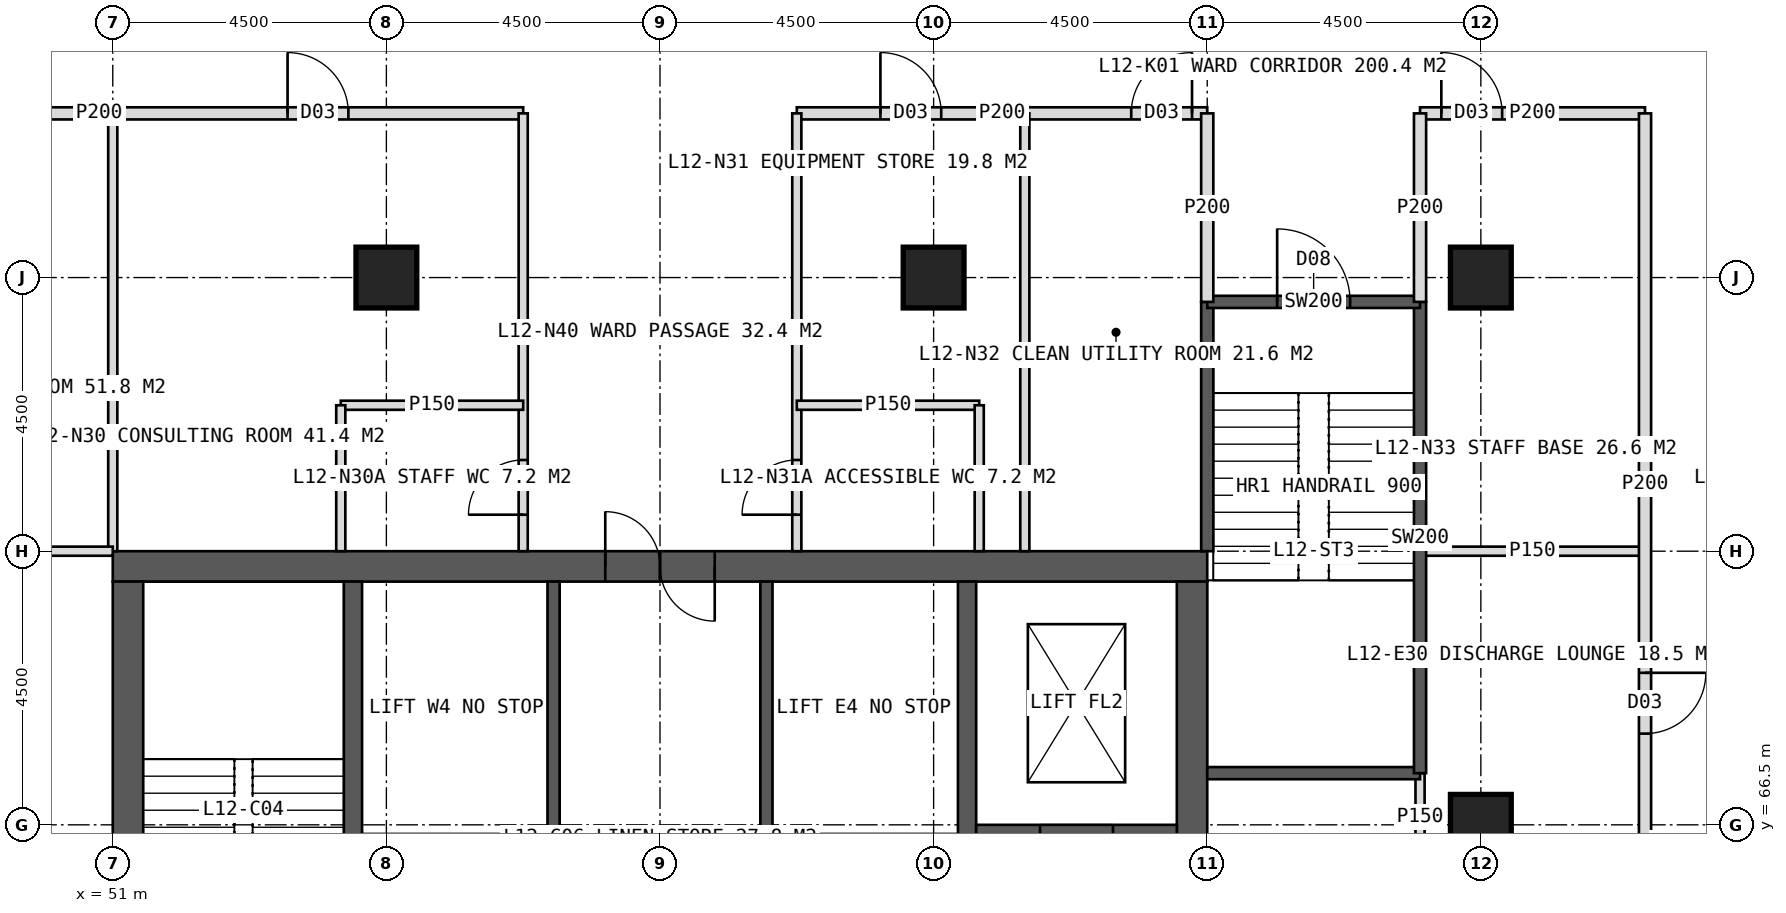
"""IFC4 building model, lengths in metres.
Left out: names, types, materials, properties, quantities, classifications, styles, units other than length and angle.
Written with IfcOpenShell. Run it as: python <this file> out.ifc"""

import sys

from ifc_helpers import new_model, si_unit, direction, frame, frame_2d, origin, origin_2d, place, context, subcontext, project, spatial, rectangle, hollow_rectangle, extrude, element, fill, save


model = new_model("IFC4")
c1 = context("Model", 3, precision=1e-05, world=origin(), true_north=direction((0.0, 1.0)))
c2 = subcontext(c1, "Body", "Model", "MODEL_VIEW")
j1 = project(units=[si_unit("LENGTHUNIT", "METRE"), si_unit("PLANEANGLEUNIT", "RADIAN")], contexts=[c1])
p1 = place(None, origin())
s1 = spatial("IfcSite", under=j1, at=p1, CompositionType="ELEMENT")
p2 = place(p1, origin())
s2 = spatial("IfcBuilding", under=s1, at=p2, CompositionType="ELEMENT")
p3 = place(p2, frame((0.0, 0.0, 55.0)))
s3 = spatial("IfcBuildingStorey", under=s2, at=p3, CompositionType="ELEMENT", Elevation=55.0)
p4 = place(p3, frame((51.0, 70.75, 0.0), z_axis=(0.0, 0.0, 1.0), x_axis=(1.0, 0.0, 0.0)))
e1 = element("IfcWall", 1, at=p4, inside=s3, PredefinedType="SHEAR", context=c2, shape_type="SweptSolid", body=[
    extrude(rectangle(XDim=18.0, YDim=0.5, at=frame_2d((9.0, 0.0))), origin(), (0.0, 0.0, 1.0), 4.0),
])
p5 = place(p4, frame((8.1, 0.0, 0.0)))
e2 = element("IfcOpeningElement", 2, at=p5, cuts=e1, PredefinedType="OPENING", context=c2, shape_type="SweptSolid", body=[
    extrude(rectangle(XDim=1.8, YDim=2.2, at=frame_2d((0.9, 1.1))), frame((0.0, 0.26, 0.0), z_axis=(0.0, -1.0, 0.0), x_axis=(1.0, 0.0, 0.0)), (0.0, 0.0, 1.0), 0.52),
])
p6 = place(p3, frame((51.25, 53.5, 0.0), z_axis=(0.0, 0.0, 1.0), x_axis=(0.0, 1.0, 0.0)))
e3 = element("IfcWall", 3, at=p6, inside=s3, PredefinedType="SHEAR", context=c2, shape_type="SweptSolid", body=[
    extrude(rectangle(XDim=17.0, YDim=0.5, at=frame_2d((8.5, 0.0))), origin(), (0.0, 0.0, 1.0), 4.0),
])
p7 = place(p6, frame((6.0, 0.0, 0.0)))
e4 = element("IfcOpeningElement", 4, at=p7, cuts=e3, PredefinedType="OPENING", context=c2, shape_type="SweptSolid", body=[
    extrude(rectangle(XDim=1.5, YDim=2.2, at=frame_2d((0.75, 1.1))), frame((0.0, 0.26, 0.0), z_axis=(0.0, -1.0, 0.0), x_axis=(1.0, 0.0, 0.0)), (0.0, 0.0, 1.0), 0.52),
])
p8 = place(p3, frame((68.75, 53.5, 0.0), z_axis=(0.0, 0.0, 1.0), x_axis=(0.0, 1.0, 0.0)))
e5 = element("IfcWall", 5, at=p8, inside=s3, PredefinedType="SHEAR", context=c2, shape_type="SweptSolid", body=[
    extrude(rectangle(XDim=17.0, YDim=0.5, at=frame_2d((8.5, 0.0))), origin(), (0.0, 0.0, 1.0), 4.0),
])
p9 = place(p8, frame((9.5, 0.0, 0.0)))
e6 = element("IfcOpeningElement", 6, at=p9, cuts=e5, PredefinedType="OPENING", context=c2, shape_type="SweptSolid", body=[
    extrude(rectangle(XDim=1.5, YDim=2.2, at=frame_2d((0.75, 1.1))), frame((0.0, 0.26, 0.0), z_axis=(0.0, -1.0, 0.0), x_axis=(1.0, 0.0, 0.0)), (0.0, 0.0, 1.0), 0.52),
])
for number, where, z_axis, x_axis in (
    (7, (54.95, 53.5, 0.0), (0.0, 0.0, 1.0), (0.0, 1.0, 0.0)),
    (8, (65.05, 53.5, 0.0), (0.0, 0.0, 1.0), (0.0, 1.0, 0.0)),
):
    element("IfcWall", number, at=place(p3, frame(where, z_axis=z_axis, x_axis=x_axis)), inside=s3, PredefinedType="SHEAR", context=c2, shape_type="SweptSolid", body=[
        extrude(rectangle(XDim=17.0, YDim=0.3, at=frame_2d((8.5, 0.0))), origin(), (0.0, 0.0, 1.0), 4.0),
    ])
p10 = place(p3, frame((58.25, 53.5, 0.0), z_axis=(0.0, 0.0, 1.0), x_axis=(0.0, 1.0, 0.0)))
e9 = element("IfcWall", 9, at=p10, inside=s3, PredefinedType="SHEAR", context=c2, shape_type="SweptSolid", body=[
    extrude(rectangle(XDim=17.0, YDim=0.2, at=frame_2d((8.5, 0.0))), origin(), (0.0, 0.0, 1.0), 4.0),
])
p11 = place(p10, frame((1.375, 0.0, 0.0)))
e10 = element("IfcOpeningElement", 10, at=p11, cuts=e9, PredefinedType="OPENING", context=c2, shape_type="SweptSolid", body=[
    extrude(rectangle(XDim=1.4, YDim=2.2, at=frame_2d((0.7, 1.1))), frame((0.0, 0.11, 0.0), z_axis=(0.0, -1.0, 0.0), x_axis=(1.0, 0.0, 0.0)), (0.0, 0.0, 1.0), 0.22),
])
p12 = place(p10, frame((5.675, 0.0, 0.0)))
e11 = element("IfcOpeningElement", 11, at=p12, cuts=e9, PredefinedType="OPENING", context=c2, shape_type="SweptSolid", body=[
    extrude(rectangle(XDim=1.4, YDim=2.2, at=frame_2d((0.7, 1.1))), frame((0.0, 0.11, 0.0), z_axis=(0.0, -1.0, 0.0), x_axis=(1.0, 0.0, 0.0)), (0.0, 0.0, 1.0), 0.22),
])
p13 = place(p3, frame((61.75, 53.5, 0.0), z_axis=(0.0, 0.0, 1.0), x_axis=(0.0, 1.0, 0.0)))
e12 = element("IfcWall", 12, at=p13, inside=s3, PredefinedType="SHEAR", context=c2, shape_type="SweptSolid", body=[
    extrude(rectangle(XDim=17.0, YDim=0.2, at=frame_2d((8.5, 0.0))), origin(), (0.0, 0.0, 1.0), 4.0),
])
p14 = place(p13, frame((1.375, 0.0, 0.0)))
e13 = element("IfcOpeningElement", 13, at=p14, cuts=e12, PredefinedType="OPENING", context=c2, shape_type="SweptSolid", body=[
    extrude(rectangle(XDim=1.4, YDim=2.2, at=frame_2d((0.7, 1.1))), frame((0.0, 0.11, 0.0), z_axis=(0.0, -1.0, 0.0), x_axis=(1.0, 0.0, 0.0)), (0.0, 0.0, 1.0), 0.22),
])
p15 = place(p13, frame((5.675, 0.0, 0.0)))
e14 = element("IfcOpeningElement", 14, at=p15, cuts=e12, PredefinedType="OPENING", context=c2, shape_type="SweptSolid", body=[
    extrude(rectangle(XDim=1.4, YDim=2.2, at=frame_2d((0.7, 1.1))), frame((0.0, 0.11, 0.0), z_axis=(0.0, -1.0, 0.0), x_axis=(1.0, 0.0, 0.0)), (0.0, 0.0, 1.0), 0.22),
])
p16 = place(p3, frame((65.2, 66.35, 0.0), z_axis=(0.0, 0.0, 1.0), x_axis=(1.0, 0.0, 0.0)))
e15 = element("IfcWall", 15, at=p16, inside=s3, PredefinedType="SHEAR", context=c2, shape_type="SweptSolid", body=[
    extrude(rectangle(XDim=3.3, YDim=0.3, at=frame_2d((1.65, 0.0))), origin(), (0.0, 0.0, 1.0), 4.0),
])
p17 = place(p16, frame((1.05, 0.0, 0.0)))
e16 = element("IfcOpeningElement", 16, at=p17, cuts=e15, PredefinedType="OPENING", context=c2, shape_type="SweptSolid", body=[
    extrude(rectangle(XDim=1.2, YDim=2.2, at=frame_2d((0.6, 1.1))), frame((0.0, 0.16, 0.0), z_axis=(0.0, -1.0, 0.0), x_axis=(1.0, 0.0, 0.0)), (0.0, 0.0, 1.0), 0.32),
])
for number, where, z_axis, x_axis in (
    (17, (73.5, 75.5, 0.0), (0.0, 0.0, 1.0), (1.0, 0.0, 0.0)),
    (18, (55.5, 75.5, 0.0), (0.0, 0.0, 1.0), (1.0, 0.0, 0.0)),
    (19, (64.5, 75.5, 0.0), (0.0, 0.0, 1.0), (1.0, 0.0, 0.0)),
    (20, (73.5, 66.5, 0.0), (0.0, 0.0, 1.0), (1.0, 0.0, 0.0)),
):
    element("IfcColumn", number, at=place(p3, frame(where, z_axis=z_axis, x_axis=x_axis)), inside=s3, PredefinedType="COLUMN", context=c2, shape_type="SweptSolid", body=[
        extrude(hollow_rectangle(XDim=1.0, YDim=1.0, WallThickness=0.1, at=origin_2d()), origin(), (0.0, 0.0, 1.0), 4.0),
    ])
p18 = place(p3, frame((51.0, 71.0, 0.0), z_axis=(0.0, 0.0, 1.0), x_axis=(0.0, 1.0, 0.0)))
e21 = element("IfcWall", 21, at=p18, inside=s3, PredefinedType="PARTITIONING", context=c2, shape_type="SweptSolid", body=[
    extrude(rectangle(XDim=7.2, YDim=0.15, at=frame_2d((3.6, 0.0))), origin(), (0.0, 0.0, 1.0), 3.75),
])
p19 = place(p3, frame((43.8, 78.2, 0.0), z_axis=(0.0, 0.0, 1.0), x_axis=(1.0, 0.0, 0.0)))
e22 = element("IfcWall", 22, at=p19, inside=s3, PredefinedType="PARTITIONING", context=c2, shape_type="SweptSolid", body=[
    extrude(rectangle(XDim=13.95, YDim=0.2, at=frame_2d((6.975, 0.0))), origin(), (0.0, 0.0, 1.0), 3.75),
])
p20 = place(p19, frame((10.075, 0.0, 0.0)))
e23 = element("IfcOpeningElement", 23, at=p20, cuts=e22, PredefinedType="OPENING", context=c2, shape_type="SweptSolid", body=[
    extrude(rectangle(XDim=1.0, YDim=2.1, at=frame_2d((0.5, 1.05))), frame((0.0, 0.11, 0.0), z_axis=(0.0, -1.0, 0.0), x_axis=(1.0, 0.0, 0.0)), (0.0, 0.0, 1.0), 0.22),
])
p21 = place(p3, frame((62.25, 78.2, 0.0), z_axis=(0.0, 0.0, 1.0), x_axis=(1.0, 0.0, 0.0)))
e24 = element("IfcWall", 24, at=p21, inside=s3, PredefinedType="PARTITIONING", context=c2, shape_type="SweptSolid", body=[
    extrude(rectangle(XDim=6.75, YDim=0.2, at=frame_2d((3.375, 0.0))), origin(), (0.0, 0.0, 1.0), 3.75),
])
p22 = place(p21, frame((1.375, 0.0, 0.0)))
e25 = element("IfcOpeningElement", 25, at=p22, cuts=e24, PredefinedType="OPENING", context=c2, shape_type="SweptSolid", body=[
    extrude(rectangle(XDim=1.0, YDim=2.1, at=frame_2d((0.5, 1.05))), frame((0.0, 0.11, 0.0), z_axis=(0.0, -1.0, 0.0), x_axis=(1.0, 0.0, 0.0)), (0.0, 0.0, 1.0), 0.22),
])
p23 = place(p21, frame((5.5, 0.0, 0.0)))
e26 = element("IfcOpeningElement", 26, at=p23, cuts=e24, PredefinedType="OPENING", context=c2, shape_type="SweptSolid", body=[
    extrude(rectangle(XDim=1.0, YDim=2.1, at=frame_2d((0.5, 1.05))), frame((0.0, 0.11, 0.0), z_axis=(0.0, -1.0, 0.0), x_axis=(1.0, 0.0, 0.0)), (0.0, 0.0, 1.0), 0.22),
])
p24 = place(p3, frame((72.5, 78.2, 0.0), z_axis=(0.0, 0.0, 1.0), x_axis=(1.0, 0.0, 0.0)))
e27 = element("IfcWall", 27, at=p24, inside=s3, PredefinedType="PARTITIONING", context=c2, shape_type="SweptSolid", body=[
    extrude(rectangle(XDim=3.7, YDim=0.2, at=frame_2d((1.85, 0.0))), origin(), (0.0, 0.0, 1.0), 3.75),
])
p25 = place(p24, frame((0.35, 0.0, 0.0)))
e28 = element("IfcOpeningElement", 28, at=p25, cuts=e27, PredefinedType="OPENING", context=c2, shape_type="SweptSolid", body=[
    extrude(rectangle(XDim=1.0, YDim=2.1, at=frame_2d((0.5, 1.05))), frame((0.0, 0.11, 0.0), z_axis=(0.0, -1.0, 0.0), x_axis=(1.0, 0.0, 0.0)), (0.0, 0.0, 1.0), 0.22),
])
p26 = place(p3, frame((57.75, 71.0, 0.0), z_axis=(0.0, 0.0, 1.0), x_axis=(0.0, 1.0, 0.0)))
e29 = element("IfcWall", 29, at=p26, inside=s3, PredefinedType="PARTITIONING", context=c2, shape_type="SweptSolid", body=[
    extrude(rectangle(XDim=7.2, YDim=0.15, at=frame_2d((3.6, 0.0))), origin(), (0.0, 0.0, 1.0), 3.75),
])
p27 = place(p26, frame((0.6, 0.0, 0.0)))
e30 = element("IfcOpeningElement", 30, at=p27, cuts=e29, PredefinedType="OPENING", context=c2, shape_type="SweptSolid", body=[
    extrude(rectangle(XDim=0.9, YDim=2.1, at=frame_2d((0.45, 1.05))), frame((0.0, 0.085, 0.0), z_axis=(0.0, -1.0, 0.0), x_axis=(1.0, 0.0, 0.0)), (0.0, 0.0, 1.0), 0.17),
])
p28 = place(p3, frame((62.25, 71.0, 0.0), z_axis=(0.0, 0.0, 1.0), x_axis=(0.0, 1.0, 0.0)))
e31 = element("IfcWall", 31, at=p28, inside=s3, PredefinedType="PARTITIONING", context=c2, shape_type="SweptSolid", body=[
    extrude(rectangle(XDim=7.2, YDim=0.15, at=frame_2d((3.6, 0.0))), origin(), (0.0, 0.0, 1.0), 3.75),
])
p29 = place(p28, frame((0.6, 0.0, 0.0)))
e32 = element("IfcOpeningElement", 32, at=p29, cuts=e31, PredefinedType="OPENING", context=c2, shape_type="SweptSolid", body=[
    extrude(rectangle(XDim=0.9, YDim=2.1, at=frame_2d((0.45, 1.05))), frame((0.0, 0.085, 0.0), z_axis=(0.0, -1.0, 0.0), x_axis=(1.0, 0.0, 0.0)), (0.0, 0.0, 1.0), 0.17),
])
p30 = place(p3, frame((66.0, 71.0, 0.0), z_axis=(0.0, 0.0, 1.0), x_axis=(0.0, 1.0, 0.0)))
e33 = element("IfcWall", 33, at=p30, inside=s3, PredefinedType="PARTITIONING", context=c2, shape_type="SweptSolid", body=[
    extrude(rectangle(XDim=7.2, YDim=0.15, at=frame_2d((3.6, 0.0))), origin(), (0.0, 0.0, 1.0), 3.75),
])
p31 = place(p3, frame((54.75, 73.4, 0.0), z_axis=(0.0, 0.0, 1.0), x_axis=(1.0, 0.0, 0.0)))
e34 = element("IfcWall", 34, at=p31, inside=s3, PredefinedType="PARTITIONING", context=c2, shape_type="SweptSolid", body=[
    extrude(rectangle(XDim=3.0, YDim=0.15, at=frame_2d((1.5, 0.0))), origin(), (0.0, 0.0, 1.0), 3.75),
])
p32 = place(p3, frame((54.75, 71.0, 0.0), z_axis=(0.0, 0.0, 1.0), x_axis=(0.0, 1.0, 0.0)))
e35 = element("IfcWall", 35, at=p32, inside=s3, PredefinedType="PARTITIONING", context=c2, shape_type="SweptSolid", body=[
    extrude(rectangle(XDim=2.4, YDim=0.15, at=frame_2d((1.2, 0.0))), origin(), (0.0, 0.0, 1.0), 3.75),
])
p33 = place(p3, frame((62.25, 73.4, 0.0), z_axis=(0.0, 0.0, 1.0), x_axis=(1.0, 0.0, 0.0)))
e36 = element("IfcWall", 36, at=p33, inside=s3, PredefinedType="PARTITIONING", context=c2, shape_type="SweptSolid", body=[
    extrude(rectangle(XDim=3.0, YDim=0.15, at=frame_2d((1.5, 0.0))), origin(), (0.0, 0.0, 1.0), 3.75),
])
p34 = place(p3, frame((65.25, 71.0, 0.0), z_axis=(0.0, 0.0, 1.0), x_axis=(0.0, 1.0, 0.0)))
e37 = element("IfcWall", 37, at=p34, inside=s3, PredefinedType="PARTITIONING", context=c2, shape_type="SweptSolid", body=[
    extrude(rectangle(XDim=2.4, YDim=0.15, at=frame_2d((1.2, 0.0))), origin(), (0.0, 0.0, 1.0), 3.75),
])
p35 = place(p3, frame((51.0, 71.0, 0.0), z_axis=(0.0, 0.0, 1.0), x_axis=(-1.0, 0.0, 0.0)))
e38 = element("IfcWall", 38, at=p35, inside=s3, PredefinedType="PARTITIONING", context=c2, shape_type="SweptSolid", body=[
    extrude(rectangle(XDim=7.2, YDim=0.15, at=frame_2d((3.6, 0.0))), origin(), (0.0, 0.0, 1.0), 3.75),
])
p36 = place(p3, frame((72.5, 71.0, 0.0), z_axis=(0.0, 0.0, 1.0), x_axis=(1.0, 0.0, 0.0)))
e39 = element("IfcWall", 39, at=p36, inside=s3, PredefinedType="PARTITIONING", context=c2, shape_type="SweptSolid", body=[
    extrude(rectangle(XDim=3.7, YDim=0.15, at=frame_2d((1.85, 0.0))), origin(), (0.0, 0.0, 1.0), 3.75),
])
p37 = place(p3, frame((76.2, 78.2, 0.0), z_axis=(0.0, 0.0, 1.0), x_axis=(0.0, -1.0, 0.0)))
e40 = element("IfcWall", 40, at=p37, inside=s3, PredefinedType="PARTITIONING", context=c2, shape_type="SweptSolid", body=[
    extrude(rectangle(XDim=12.2, YDim=0.2, at=frame_2d((6.1, 0.0))), origin(), (0.0, 0.0, 1.0), 3.75),
])
p38 = place(p37, frame((9.2, 0.0, 0.0)))
e41 = element("IfcOpeningElement", 41, at=p38, cuts=e40, PredefinedType="OPENING", context=c2, shape_type="SweptSolid", body=[
    extrude(rectangle(XDim=1.0, YDim=2.1, at=frame_2d((0.5, 1.05))), frame((0.0, 0.11, 0.0), z_axis=(0.0, -1.0, 0.0), x_axis=(1.0, 0.0, 0.0)), (0.0, 0.0, 1.0), 0.22),
])
p39 = place(p3, frame((72.5, 65.9, 0.0), z_axis=(0.0, 0.0, 1.0), x_axis=(0.0, 1.0, 0.0)))
e42 = element("IfcWall", 42, at=p39, inside=s3, PredefinedType="PARTITIONING", context=c2, shape_type="SweptSolid", body=[
    extrude(rectangle(XDim=1.45, YDim=0.15, at=frame_2d((0.725, 0.0))), origin(), (0.0, 0.0, 1.0), 3.75),
])
p40 = place(p3, frame((69.0, 71.0, 0.0), z_axis=(0.0, 0.0, 1.0), x_axis=(0.0, 1.0, 0.0)))
e43 = element("IfcWall", 43, at=p40, inside=s3, PredefinedType="SOLIDWALL", context=c2, shape_type="SweptSolid", body=[
    extrude(rectangle(XDim=4.1, YDim=0.2, at=frame_2d((2.05, 0.0))), origin(), (0.0, 0.0, 1.0), 3.75),
])
p41 = place(p3, frame((69.0, 67.35, 0.0), z_axis=(0.0, 0.0, 1.0), x_axis=(1.0, 0.0, 0.0)))
e44 = element("IfcWall", 44, at=p41, inside=s3, PredefinedType="SOLIDWALL", context=c2, shape_type="SweptSolid", body=[
    extrude(rectangle(XDim=3.5, YDim=0.2, at=frame_2d((1.75, 0.0))), origin(), (0.0, 0.0, 1.0), 3.75),
])
p42 = place(p3, frame((72.5, 67.35, 0.0), z_axis=(0.0, 0.0, 1.0), x_axis=(0.0, 1.0, 0.0)))
e45 = element("IfcWall", 45, at=p42, inside=s3, PredefinedType="SOLIDWALL", context=c2, shape_type="SweptSolid", body=[
    extrude(rectangle(XDim=7.75, YDim=0.2, at=frame_2d((3.875, 0.0))), origin(), (0.0, 0.0, 1.0), 3.75),
])
p43 = place(p3, frame((69.0, 75.1, 0.0), z_axis=(0.0, 0.0, 1.0), x_axis=(1.0, 0.0, 0.0)))
e46 = element("IfcWall", 46, at=p43, inside=s3, PredefinedType="SOLIDWALL", context=c2, shape_type="SweptSolid", body=[
    extrude(rectangle(XDim=3.5, YDim=0.2, at=frame_2d((1.75, 0.0))), origin(), (0.0, 0.0, 1.0), 3.75),
])
p44 = place(p43, frame((1.15, 0.0, 0.0)))
e47 = element("IfcOpeningElement", 47, at=p44, cuts=e46, PredefinedType="OPENING", context=c2, shape_type="SweptSolid", body=[
    extrude(rectangle(XDim=1.2, YDim=2.1, at=frame_2d((0.6, 1.05))), frame((0.0, 0.11, 0.0), z_axis=(0.0, -1.0, 0.0), x_axis=(1.0, 0.0, 0.0)), (0.0, 0.0, 1.0), 0.22),
])
for number, where, z_axis, x_axis in (
    (48, (69.0, 75.1, 0.0), (0.0, 0.0, 1.0), (0.0, 1.0, 0.0)),
    (49, (72.5, 75.1, 0.0), (0.0, 0.0, 1.0), (0.0, 1.0, 0.0)),
):
    element("IfcWall", number, at=place(p3, frame(where, z_axis=z_axis, x_axis=x_axis)), inside=s3, PredefinedType="PARTITIONING", context=c2, shape_type="SweptSolid", body=[
        extrude(rectangle(XDim=3.1, YDim=0.2, at=frame_2d((1.55, 0.0))), origin(), (0.0, 0.0, 1.0), 3.75),
    ])
p45 = place(p27, origin())
e50 = element("IfcDoor", 50, at=p45, inside=s3, OperationType="SINGLE_SWING_LEFT", PredefinedType="DOOR", context=c2, shape_type="SweptSolid", body=[
    extrude(rectangle(XDim=0.9, YDim=2.1, at=frame_2d((0.45, 1.05))), frame((0.0, 0.025, 0.0), z_axis=(0.0, -1.0, 0.0), x_axis=(1.0, 0.0, 0.0)), (0.0, 0.0, 1.0), 0.05),
])
fill(e30, e50)
p46 = place(p20, origin())
e51 = element("IfcDoor", 51, at=p46, inside=s3, OperationType="SINGLE_SWING_LEFT", PredefinedType="DOOR", context=c2, shape_type="SweptSolid", body=[
    extrude(rectangle(XDim=1.0, YDim=2.1, at=frame_2d((0.5, 1.05))), frame((0.0, 0.025, 0.0), z_axis=(0.0, -1.0, 0.0), x_axis=(1.0, 0.0, 0.0)), (0.0, 0.0, 1.0), 0.05),
])
fill(e23, e51)
p47 = place(p29, origin())
e52 = element("IfcDoor", 52, at=p47, inside=s3, OperationType="SINGLE_SWING_LEFT", PredefinedType="DOOR", context=c2, shape_type="SweptSolid", body=[
    extrude(rectangle(XDim=0.9, YDim=2.1, at=frame_2d((0.45, 1.05))), frame((0.0, 0.025, 0.0), z_axis=(0.0, -1.0, 0.0), x_axis=(1.0, 0.0, 0.0)), (0.0, 0.0, 1.0), 0.05),
])
fill(e32, e52)
p48 = place(p22, origin())
e53 = element("IfcDoor", 53, at=p48, inside=s3, OperationType="SINGLE_SWING_LEFT", PredefinedType="DOOR", context=c2, shape_type="SweptSolid", body=[
    extrude(rectangle(XDim=1.0, YDim=2.1, at=frame_2d((0.5, 1.05))), frame((0.0, 0.025, 0.0), z_axis=(0.0, -1.0, 0.0), x_axis=(1.0, 0.0, 0.0)), (0.0, 0.0, 1.0), 0.05),
])
fill(e25, e53)
p49 = place(p23, origin())
e54 = element("IfcDoor", 54, at=p49, inside=s3, OperationType="SINGLE_SWING_RIGHT", PredefinedType="DOOR", context=c2, shape_type="SweptSolid", body=[
    extrude(rectangle(XDim=1.0, YDim=2.1, at=frame_2d((0.5, 1.05))), frame((0.0, 0.025, 0.0), z_axis=(0.0, -1.0, 0.0), x_axis=(1.0, 0.0, 0.0)), (0.0, 0.0, 1.0), 0.05),
])
fill(e26, e54)
p50 = place(p25, origin())
e55 = element("IfcDoor", 55, at=p50, inside=s3, OperationType="SINGLE_SWING_LEFT", PredefinedType="DOOR", context=c2, shape_type="SweptSolid", body=[
    extrude(rectangle(XDim=1.0, YDim=2.1, at=frame_2d((0.5, 1.05))), frame((0.0, 0.025, 0.0), z_axis=(0.0, -1.0, 0.0), x_axis=(1.0, 0.0, 0.0)), (0.0, 0.0, 1.0), 0.05),
])
fill(e28, e55)
p51 = place(p38, origin())
e56 = element("IfcDoor", 56, at=p51, inside=s3, OperationType="SINGLE_SWING_LEFT", PredefinedType="DOOR", context=c2, shape_type="SweptSolid", body=[
    extrude(rectangle(XDim=1.0, YDim=2.1, at=frame_2d((0.5, 1.05))), frame((0.0, 0.025, 0.0), z_axis=(0.0, -1.0, 0.0), x_axis=(1.0, 0.0, 0.0)), (0.0, 0.0, 1.0), 0.05),
])
fill(e41, e56)
p52 = place(p17, origin())
e57 = element("IfcDoor", 57, at=p52, inside=s3, OperationType="SLIDING_TO_LEFT", PredefinedType="DOOR", context=c2, shape_type="SweptSolid", body=[
    extrude(rectangle(XDim=1.2, YDim=2.2, at=frame_2d((0.6, 1.1))), frame((0.0, 0.025, 0.0), z_axis=(0.0, -1.0, 0.0), x_axis=(1.0, 0.0, 0.0)), (0.0, 0.0, 1.0), 0.05),
])
fill(e16, e57)
p53 = place(p5, origin())
e58 = element("IfcDoor", 58, at=p53, inside=s3, OperationType="DOUBLE_DOOR_SINGLE_SWING", PredefinedType="DOOR", context=c2, shape_type="SweptSolid", body=[
    extrude(rectangle(XDim=1.8, YDim=2.2, at=frame_2d((0.9, 1.1))), frame((0.0, 0.025, 0.0), z_axis=(0.0, -1.0, 0.0), x_axis=(1.0, 0.0, 0.0)), (0.0, 0.0, 1.0), 0.05),
])
fill(e2, e58)
p54 = place(p44, origin())
e59 = element("IfcDoor", 59, at=p54, inside=s3, OperationType="SINGLE_SWING_LEFT", PredefinedType="DOOR", context=c2, shape_type="SweptSolid", body=[
    extrude(rectangle(XDim=1.2, YDim=2.1, at=frame_2d((0.6, 1.05))), frame((0.0, 0.025, 0.0), z_axis=(0.0, -1.0, 0.0), x_axis=(1.0, 0.0, 0.0)), (0.0, 0.0, 1.0), 0.05),
])
fill(e47, e59)
save(model, sys.argv[1])
